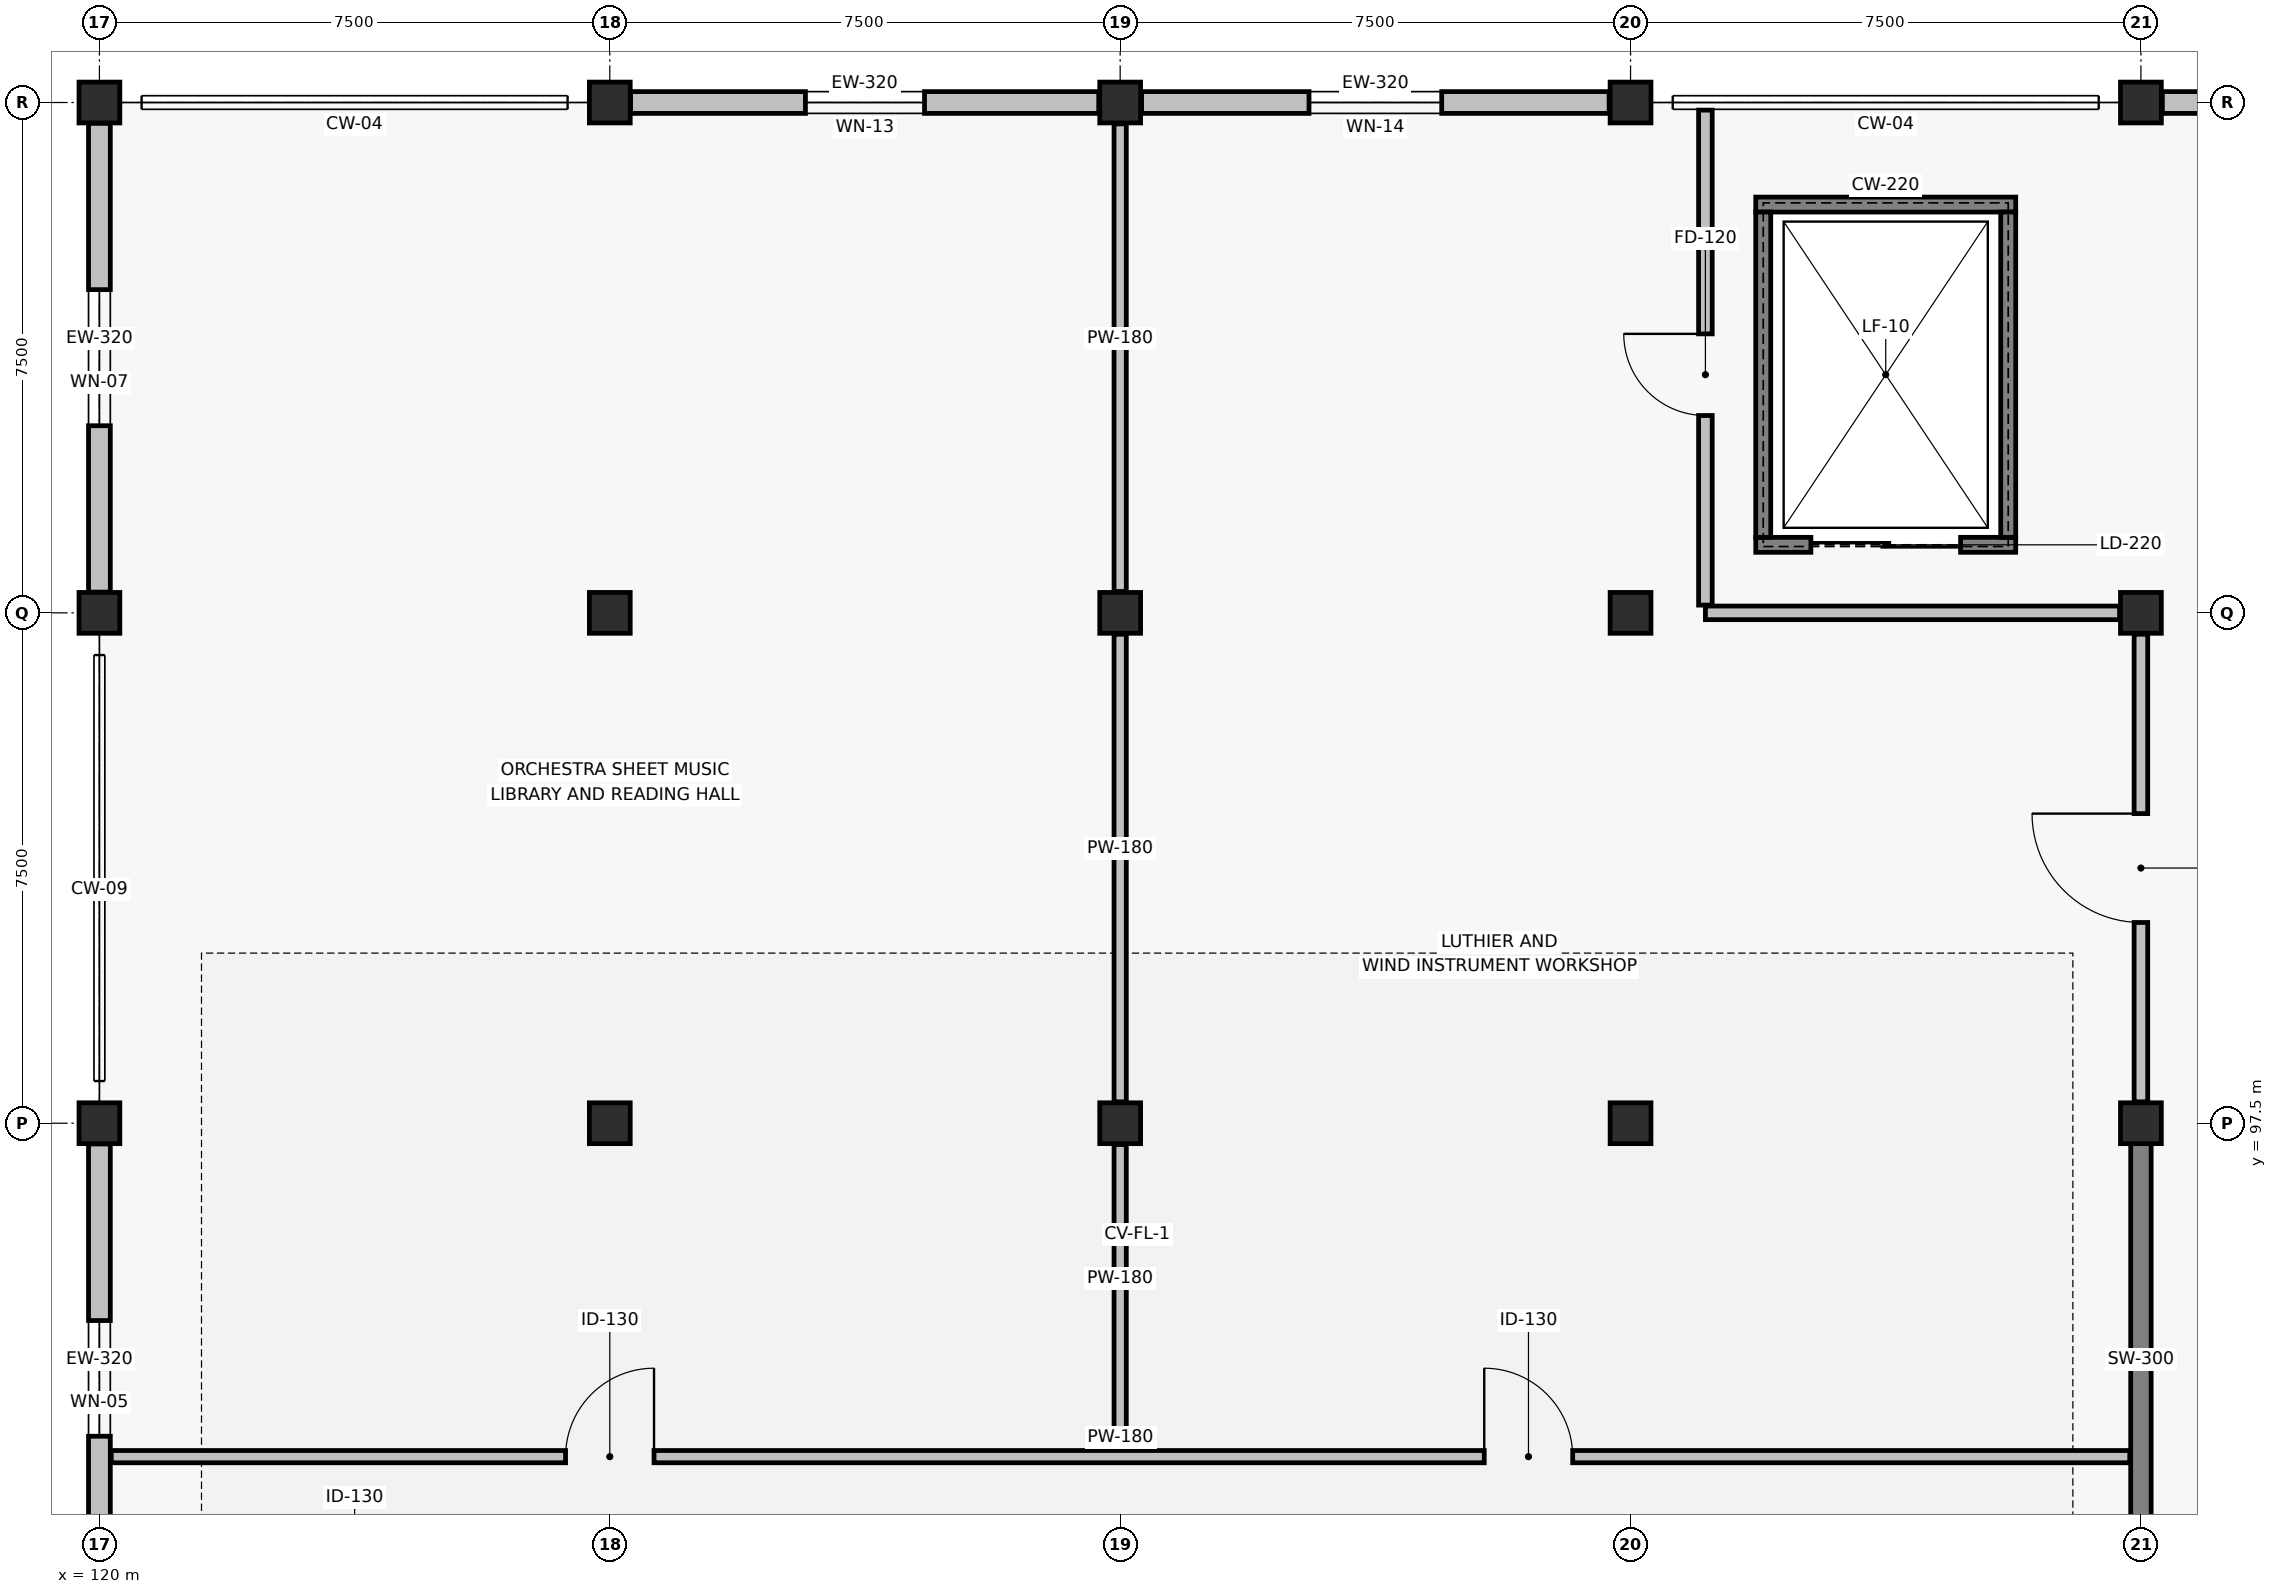
"""IFC4 building model, lengths in metres.
Left out: names, types, materials, properties, quantities, classifications, styles, units other than length and angle.
Written with IfcOpenShell. Run it as: python <this file> out.ifc"""

import sys

from ifc_helpers import new_model, si_unit, direction, frame, frame_2d, origin, origin_2d, place, context, subcontext, project, spatial, rectangle, extrude, element, fill, save


model = new_model("IFC4")
c1 = context("Model", 3, precision=1e-05, world=origin(), true_north=direction((0.0, 1.0)))
c2 = subcontext(c1, "Body", "Model", "MODEL_VIEW")
j1 = project(units=[si_unit("LENGTHUNIT", "METRE"), si_unit("PLANEANGLEUNIT", "RADIAN")], contexts=[c1])
p1 = place(None, origin())
s1 = spatial("IfcSite", under=j1, at=p1, CompositionType="ELEMENT")
p2 = place(p1, origin())
s2 = spatial("IfcBuilding", under=s1, at=p2, CompositionType="ELEMENT")
p3 = place(p2, frame((0.0, 0.0, 9.0)))
s3 = spatial("IfcBuildingStorey", under=s2, at=p3, CompositionType="ELEMENT", Elevation=9.0)
for number, where, z_axis, x_axis in (
    (1, (120.0, 97.5, 0.0), (0.0, 0.0, 1.0), (1.0, 0.0, 0.0)),
    (2, (120.0, 105.0, 0.0), (0.0, 0.0, 1.0), (1.0, 0.0, 0.0)),
    (3, (120.0, 112.5, 0.0), (0.0, 0.0, 1.0), (1.0, 0.0, 0.0)),
    (4, (127.5, 97.5, 0.0), (0.0, 0.0, 1.0), (1.0, 0.0, 0.0)),
    (5, (127.5, 105.0, 0.0), (0.0, 0.0, 1.0), (1.0, 0.0, 0.0)),
    (6, (127.5, 112.5, 0.0), (0.0, 0.0, 1.0), (1.0, 0.0, 0.0)),
    (7, (135.0, 97.5, 0.0), (0.0, 0.0, 1.0), (1.0, 0.0, 0.0)),
    (8, (135.0, 105.0, 0.0), (0.0, 0.0, 1.0), (1.0, 0.0, 0.0)),
    (9, (135.0, 112.5, 0.0), (0.0, 0.0, 1.0), (1.0, 0.0, 0.0)),
    (10, (142.5, 97.5, 0.0), (0.0, 0.0, 1.0), (1.0, 0.0, 0.0)),
    (11, (142.5, 105.0, 0.0), (0.0, 0.0, 1.0), (1.0, 0.0, 0.0)),
    (12, (142.5, 112.5, 0.0), (0.0, 0.0, 1.0), (1.0, 0.0, 0.0)),
    (13, (150.0, 97.5, 0.0), (0.0, 0.0, 1.0), (1.0, 0.0, 0.0)),
    (14, (150.0, 105.0, 0.0), (0.0, 0.0, 1.0), (1.0, 0.0, 0.0)),
    (15, (150.0, 112.5, 0.0), (0.0, 0.0, 1.0), (1.0, 0.0, 0.0)),
):
    element("IfcColumn", number, at=place(p3, frame(where, z_axis=z_axis, x_axis=x_axis)), inside=s3, PredefinedType="COLUMN", context=c2, shape_type="SweptSolid", body=[
        extrude(rectangle(XDim=0.6, YDim=0.6, at=origin_2d()), origin(), (0.0, 0.0, 1.0), 4.2),
    ])
p4 = place(p3, frame((150.0, 90.3, 0.0), z_axis=(0.0, 0.0, 1.0), x_axis=(0.0, 1.0, 0.0)))
e16 = element("IfcWall", 16, at=p4, inside=s3, PredefinedType="SHEAR", context=c2, shape_type="SweptSolid", body=[
    extrude(rectangle(XDim=6.9, YDim=0.3, at=frame_2d((3.45, 0.0))), origin(), (0.0, 0.0, 1.0), 3.9),
])
p5 = place(p3, frame((127.805, 112.5, 0.0), z_axis=(0.0, 0.0, 1.0), x_axis=(1.0, 0.0, 0.0)))
e17 = element("IfcWall", 17, at=p5, inside=s3, PredefinedType="SOLIDWALL", context=c2, shape_type="SweptSolid", body=[
    extrude(rectangle(XDim=6.88, YDim=0.32, at=frame_2d((3.44, 0.0))), origin(), (0.0, 0.0, 1.0), 3.12),
])
p6 = place(p5, frame((2.57, 0.0, 0.6)))
e18 = element("IfcOpeningElement", 18, at=p6, cuts=e17, PredefinedType="OPENING", context=c2, shape_type="SweptSolid", body=[
    extrude(rectangle(XDim=1.75, YDim=1.3, at=frame_2d((0.875, 0.65))), frame((0.0, 0.17, 0.0), z_axis=(0.0, -1.0, 0.0), x_axis=(1.0, 0.0, 0.0)), (0.0, 0.0, 1.0), 0.34),
])
p7 = place(p3, frame((135.315, 112.5, 0.0), z_axis=(0.0, 0.0, 1.0), x_axis=(1.0, 0.0, 0.0)))
e19 = element("IfcWall", 19, at=p7, inside=s3, PredefinedType="SOLIDWALL", context=c2, shape_type="SweptSolid", body=[
    extrude(rectangle(XDim=6.87, YDim=0.32, at=frame_2d((3.435, 0.0))), origin(), (0.0, 0.0, 1.0), 3.12),
])
p8 = place(p7, frame((2.46, 0.0, 0.6)))
e20 = element("IfcOpeningElement", 20, at=p8, cuts=e19, PredefinedType="OPENING", context=c2, shape_type="SweptSolid", body=[
    extrude(rectangle(XDim=1.95, YDim=1.3, at=frame_2d((0.975, 0.65))), frame((0.0, 0.17, 0.0), z_axis=(0.0, -1.0, 0.0), x_axis=(1.0, 0.0, 0.0)), (0.0, 0.0, 1.0), 0.34),
])
p9 = place(p3, frame((150.315, 112.5, 0.0), z_axis=(0.0, 0.0, 1.0), x_axis=(1.0, 0.0, 0.0)))
e21 = element("IfcWall", 21, at=p9, inside=s3, PredefinedType="SOLIDWALL", context=c2, shape_type="SweptSolid", body=[
    extrude(rectangle(XDim=6.87, YDim=0.32, at=frame_2d((3.435, 0.0))), origin(), (0.0, 0.0, 1.0), 3.12),
])
p10 = place(p9, frame((2.285, 0.0, 0.6)))
e22 = element("IfcOpeningElement", 22, at=p10, cuts=e21, PredefinedType="OPENING", context=c2, shape_type="SweptSolid", body=[
    extrude(rectangle(XDim=2.3, YDim=1.3, at=frame_2d((1.15, 0.65))), frame((0.0, 0.17, 0.0), z_axis=(0.0, -1.0, 0.0), x_axis=(1.0, 0.0, 0.0)), (0.0, 0.0, 1.0), 0.34),
])
p11 = place(p3, frame((120.0, 90.305, 0.0), z_axis=(0.0, 0.0, 1.0), x_axis=(0.0, 1.0, 0.0)))
e23 = element("IfcWall", 23, at=p11, inside=s3, PredefinedType="SOLIDWALL", context=c2, shape_type="SweptSolid", body=[
    extrude(rectangle(XDim=6.89, YDim=0.32, at=frame_2d((3.445, 0.0))), origin(), (0.0, 0.0, 1.0), 2.82),
])
p12 = place(p11, frame((2.595, 0.0, 0.6)))
e24 = element("IfcOpeningElement", 24, at=p12, cuts=e23, PredefinedType="OPENING", context=c2, shape_type="SweptSolid", body=[
    extrude(rectangle(XDim=1.7, YDim=1.8, at=frame_2d((0.85, 0.9))), frame((0.0, 0.17, 0.0), z_axis=(0.0, -1.0, 0.0), x_axis=(1.0, 0.0, 0.0)), (0.0, 0.0, 1.0), 0.34),
])
p13 = place(p3, frame((120.0, 105.305, 0.0), z_axis=(0.0, 0.0, 1.0), x_axis=(0.0, 1.0, 0.0)))
e25 = element("IfcWall", 25, at=p13, inside=s3, PredefinedType="SOLIDWALL", context=c2, shape_type="SweptSolid", body=[
    extrude(rectangle(XDim=6.89, YDim=0.32, at=frame_2d((3.445, 0.0))), origin(), (0.0, 0.0, 1.0), 2.97),
])
p14 = place(p13, frame((2.445, 0.0, 0.6)))
e26 = element("IfcOpeningElement", 26, at=p14, cuts=e25, PredefinedType="OPENING", context=c2, shape_type="SweptSolid", body=[
    extrude(rectangle(XDim=2.0, YDim=1.45, at=frame_2d((1.0, 0.725))), frame((0.0, 0.17, 0.0), z_axis=(0.0, -1.0, 0.0), x_axis=(1.0, 0.0, 0.0)), (0.0, 0.0, 1.0), 0.34),
])
p15 = place(p3, frame((144.34, 106.0, 0.0), z_axis=(0.0, 0.0, 1.0), x_axis=(1.0, 0.0, 0.0)))
e27 = element("IfcWall", 27, at=p15, inside=s3, PredefinedType="SOLIDWALL", context=c2, shape_type="SweptSolid", body=[
    extrude(rectangle(XDim=3.82, YDim=0.22, at=frame_2d((1.91, 0.0))), origin(), (0.0, 0.0, 1.0), 3.92),
])
p16 = place(p15, frame((0.81, 0.0, 0.0)))
e28 = element("IfcOpeningElement", 28, at=p16, cuts=e27, PredefinedType="OPENING", context=c2, shape_type="SweptSolid", body=[
    extrude(rectangle(XDim=2.2, YDim=2.35, at=frame_2d((1.1, 1.175))), frame((0.0, 0.12, 0.0), z_axis=(0.0, -1.0, 0.0), x_axis=(1.0, 0.0, 0.0)), (0.0, 0.0, 1.0), 0.24),
])
p17 = place(p3, frame((144.34, 111.0, 0.0), z_axis=(0.0, 0.0, 1.0), x_axis=(1.0, 0.0, 0.0)))
e29 = element("IfcWall", 29, at=p17, inside=s3, PredefinedType="SOLIDWALL", context=c2, shape_type="SweptSolid", body=[
    extrude(rectangle(XDim=3.82, YDim=0.22, at=frame_2d((1.91, 0.0))), origin(), (0.0, 0.0, 1.0), 3.92),
])
for number, where, z_axis, x_axis in (
    (30, (144.45, 106.11, 0.0), (0.0, 0.0, 1.0), (0.0, 1.0, 0.0)),
    (31, (148.05, 106.11, 0.0), (0.0, 0.0, 1.0), (0.0, 1.0, 0.0)),
):
    element("IfcWall", number, at=place(p3, frame(where, z_axis=z_axis, x_axis=x_axis)), inside=s3, PredefinedType="SOLIDWALL", context=c2, shape_type="SweptSolid", body=[
        extrude(rectangle(XDim=4.78, YDim=0.22, at=frame_2d((2.39, 0.0))), origin(), (0.0, 0.0, 1.0), 3.92),
    ])
p18 = place(p3, frame((143.6, 105.0, 0.0), z_axis=(0.0, 0.0, 1.0), x_axis=(1.0, 0.0, 0.0)))
e32 = element("IfcWall", 32, at=p18, inside=s3, PredefinedType="PARTITIONING", context=c2, shape_type="SweptSolid", body=[
    extrude(rectangle(XDim=6.086, YDim=0.2, at=frame_2d((3.043, 0.0))), origin(), (0.0, 0.0, 1.0), 2.82),
])
p19 = place(p3, frame((143.6, 105.114, 0.0), z_axis=(0.0, 0.0, 1.0), x_axis=(0.0, 1.0, 0.0)))
e33 = element("IfcWall", 33, at=p19, inside=s3, PredefinedType="PARTITIONING", context=c2, shape_type="SweptSolid", body=[
    extrude(rectangle(XDim=7.274, YDim=0.2, at=frame_2d((3.637, 0.0))), origin(), (0.0, 0.0, 1.0), 2.97),
])
p20 = place(p19, frame((2.786, 0.0, 0.0)))
e34 = element("IfcOpeningElement", 34, at=p20, cuts=e33, PredefinedType="OPENING", context=c2, shape_type="SweptSolid", body=[
    extrude(rectangle(XDim=1.2, YDim=2.15, at=frame_2d((0.6, 1.075))), frame((0.0, 0.11, 0.0), z_axis=(0.0, -1.0, 0.0), x_axis=(1.0, 0.0, 0.0)), (0.0, 0.0, 1.0), 0.22),
])
p21 = place(p3, frame((120.174, 92.6, 0.0), z_axis=(0.0, 0.0, 1.0), x_axis=(1.0, 0.0, 0.0)))
e35 = element("IfcWall", 35, at=p21, inside=s3, PredefinedType="PARTITIONING", context=c2, shape_type="SweptSolid", body=[
    extrude(rectangle(XDim=29.662, YDim=0.18, at=frame_2d((14.831, 0.0))), origin(), (0.0, 0.0, 1.0), 3.17),
])
p22 = place(p21, frame((6.676, 0.0, 0.0)))
e36 = element("IfcOpeningElement", 36, at=p22, cuts=e35, PredefinedType="OPENING", context=c2, shape_type="SweptSolid", body=[
    extrude(rectangle(XDim=1.3, YDim=2.15, at=frame_2d((0.65, 1.075))), frame((0.0, 0.1, 0.0), z_axis=(0.0, -1.0, 0.0), x_axis=(1.0, 0.0, 0.0)), (0.0, 0.0, 1.0), 0.2),
])
p23 = place(p21, frame((20.176, 0.0, 0.0)))
e37 = element("IfcOpeningElement", 37, at=p23, cuts=e35, PredefinedType="OPENING", context=c2, shape_type="SweptSolid", body=[
    extrude(rectangle(XDim=1.3, YDim=2.15, at=frame_2d((0.65, 1.075))), frame((0.0, 0.1, 0.0), z_axis=(0.0, -1.0, 0.0), x_axis=(1.0, 0.0, 0.0)), (0.0, 0.0, 1.0), 0.2),
])
p24 = place(p3, frame((135.0, 92.704, 0.0), z_axis=(0.0, 0.0, 1.0), x_axis=(0.0, 1.0, 0.0)))
e38 = element("IfcWall", 38, at=p24, inside=s3, PredefinedType="PARTITIONING", context=c2, shape_type="SweptSolid", body=[
    extrude(rectangle(XDim=4.482, YDim=0.18, at=frame_2d((2.241, 0.0))), origin(), (0.0, 0.0, 1.0), 3.02),
])
for number, where, z_axis, x_axis in (
    (39, (135.0, 97.814, 0.0), (0.0, 0.0, 1.0), (0.0, 1.0, 0.0)),
    (40, (135.0, 105.314, 0.0), (0.0, 0.0, 1.0), (0.0, 1.0, 0.0)),
):
    element("IfcWall", number, at=place(p3, frame(where, z_axis=z_axis, x_axis=x_axis)), inside=s3, PredefinedType="PARTITIONING", context=c2, shape_type="SweptSolid", body=[
        extrude(rectangle(XDim=6.872, YDim=0.18, at=frame_2d((3.436, 0.0))), origin(), (0.0, 0.0, 1.0), 2.92),
    ])
p25 = place(p3, frame((150.0, 97.814, 0.0), z_axis=(0.0, 0.0, 1.0), x_axis=(0.0, 1.0, 0.0)))
e41 = element("IfcWall", 41, at=p25, inside=s3, PredefinedType="PARTITIONING", context=c2, shape_type="SweptSolid", body=[
    extrude(rectangle(XDim=6.872, YDim=0.2, at=frame_2d((3.436, 0.0))), origin(), (0.0, 0.0, 1.0), 2.82),
])
p26 = place(p25, frame((2.636, 0.0, 0.0)))
e42 = element("IfcOpeningElement", 42, at=p26, cuts=e41, PredefinedType="OPENING", context=c2, shape_type="SweptSolid", body=[
    extrude(rectangle(XDim=1.6, YDim=2.16, at=frame_2d((0.8, 1.08))), frame((0.0, 0.11, 0.0), z_axis=(0.0, -1.0, 0.0), x_axis=(1.0, 0.0, 0.0)), (0.0, 0.0, 1.0), 0.22),
])
p27 = place(p6, origin())
e43 = element("IfcWindow", 43, at=p27, inside=s3, PartitioningType="SINGLE_PANEL", PredefinedType="WINDOW", context=c2, shape_type="SweptSolid", body=[
    extrude(rectangle(XDim=1.75, YDim=1.3, at=frame_2d((0.875, 0.65))), frame((0.0, 0.03, 0.0), z_axis=(0.0, -1.0, 0.0), x_axis=(1.0, 0.0, 0.0)), (0.0, 0.0, 1.0), 0.06),
])
fill(e18, e43)
p28 = place(p8, origin())
e44 = element("IfcWindow", 44, at=p28, inside=s3, PartitioningType="SINGLE_PANEL", PredefinedType="WINDOW", context=c2, shape_type="SweptSolid", body=[
    extrude(rectangle(XDim=1.95, YDim=1.3, at=frame_2d((0.975, 0.65))), frame((0.0, 0.03, 0.0), z_axis=(0.0, -1.0, 0.0), x_axis=(1.0, 0.0, 0.0)), (0.0, 0.0, 1.0), 0.06),
])
fill(e20, e44)
p29 = place(p12, origin())
e45 = element("IfcWindow", 45, at=p29, inside=s3, PartitioningType="SINGLE_PANEL", PredefinedType="WINDOW", context=c2, shape_type="SweptSolid", body=[
    extrude(rectangle(XDim=1.7, YDim=1.8, at=frame_2d((0.85, 0.9))), frame((0.0, 0.03, 0.0), z_axis=(0.0, -1.0, 0.0), x_axis=(1.0, 0.0, 0.0)), (0.0, 0.0, 1.0), 0.06),
])
fill(e24, e45)
p30 = place(p14, origin())
e46 = element("IfcWindow", 46, at=p30, inside=s3, PartitioningType="SINGLE_PANEL", PredefinedType="WINDOW", context=c2, shape_type="SweptSolid", body=[
    extrude(rectangle(XDim=2.0, YDim=1.45, at=frame_2d((1.0, 0.725))), frame((0.0, 0.03, 0.0), z_axis=(0.0, -1.0, 0.0), x_axis=(1.0, 0.0, 0.0)), (0.0, 0.0, 1.0), 0.06),
])
fill(e26, e46)
p31 = place(p16, origin())
e47 = element("IfcDoor", 47, at=p31, inside=s3, OperationType="DOUBLE_DOOR_SLIDING", PredefinedType="DOOR", context=c2, shape_type="SweptSolid", body=[
    extrude(rectangle(XDim=2.2, YDim=2.35, at=frame_2d((1.1, 1.175))), frame((0.0, 0.025, 0.0), z_axis=(0.0, -1.0, 0.0), x_axis=(1.0, 0.0, 0.0)), (0.0, 0.0, 1.0), 0.05),
])
fill(e28, e47)
p32 = place(p20, origin())
e48 = element("IfcDoor", 48, at=p32, inside=s3, OperationType="SINGLE_SWING_RIGHT", PredefinedType="DOOR", context=c2, shape_type="SweptSolid", body=[
    extrude(rectangle(XDim=1.2, YDim=2.15, at=frame_2d((0.6, 1.075))), frame((0.0, 0.025, 0.0), z_axis=(0.0, -1.0, 0.0), x_axis=(1.0, 0.0, 0.0)), (0.0, 0.0, 1.0), 0.05),
])
fill(e34, e48)
p33 = place(p22, origin())
e49 = element("IfcDoor", 49, at=p33, inside=s3, OperationType="SINGLE_SWING_RIGHT", PredefinedType="DOOR", context=c2, shape_type="SweptSolid", body=[
    extrude(rectangle(XDim=1.3, YDim=2.15, at=frame_2d((0.65, 1.075))), frame((0.0, 0.025, 0.0), z_axis=(0.0, -1.0, 0.0), x_axis=(1.0, 0.0, 0.0)), (0.0, 0.0, 1.0), 0.05),
])
fill(e36, e49)
p34 = place(p23, origin())
e50 = element("IfcDoor", 50, at=p34, inside=s3, OperationType="SINGLE_SWING_LEFT", PredefinedType="DOOR", context=c2, shape_type="SweptSolid", body=[
    extrude(rectangle(XDim=1.3, YDim=2.15, at=frame_2d((0.65, 1.075))), frame((0.0, 0.025, 0.0), z_axis=(0.0, -1.0, 0.0), x_axis=(1.0, 0.0, 0.0)), (0.0, 0.0, 1.0), 0.05),
])
fill(e37, e50)
p35 = place(p26, origin())
e51 = element("IfcDoor", 51, at=p35, inside=s3, OperationType="SINGLE_SWING_RIGHT", PredefinedType="DOOR", context=c2, shape_type="SweptSolid", body=[
    extrude(rectangle(XDim=1.6, YDim=2.16, at=frame_2d((0.8, 1.08))), frame((0.0, 0.025, 0.0), z_axis=(0.0, -1.0, 0.0), x_axis=(1.0, 0.0, 0.0)), (0.0, 0.0, 1.0), 0.05),
])
fill(e42, e51)
save(model, sys.argv[1])
